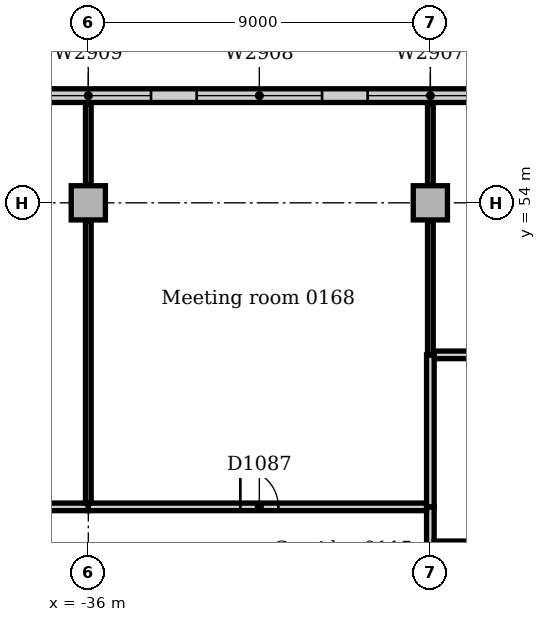
"""IFC4 building model, lengths in metres.
Left out: names, types, materials, properties, quantities, classifications, styles, units other than length and angle.
Written with IfcOpenShell. Run it as: python <this file> out.ifc"""

import sys

from ifc_helpers import new_model, si_unit, direction, frame, frame_2d, origin, origin_2d, place, context, subcontext, project, spatial, rectangle, extrude, element, fill, save


model = new_model("IFC4")
c1 = context("Model", 3, precision=1e-05, world=origin(), true_north=direction((0.0, 1.0)))
c2 = subcontext(c1, "Body", "Model", "MODEL_VIEW")
j1 = project(units=[si_unit("LENGTHUNIT", "METRE"), si_unit("PLANEANGLEUNIT", "RADIAN")], contexts=[c1])
p1 = place(None, origin())
s1 = spatial("IfcSite", under=j1, at=p1, CompositionType="ELEMENT")
p2 = place(p1, origin())
s2 = spatial("IfcBuilding", under=s1, at=p2, CompositionType="ELEMENT")
p3 = place(p2, frame((0.0, 0.0, 6.0)))
s3 = spatial("IfcBuildingStorey", under=s2, at=p3, CompositionType="ELEMENT", Elevation=6.0)
for number, where, z_axis, x_axis in (
    (1, (-36.0, 54.0, 0.0), (0.0, 0.0, 1.0), (1.0, 0.0, 0.0)),
    (2, (-27.0, 54.0, 0.0), (0.0, 0.0, 1.0), (1.0, 0.0, 0.0)),
):
    element("IfcColumn", number, at=place(p3, frame(where, z_axis=z_axis, x_axis=x_axis)), inside=s3, PredefinedType="COLUMN", context=c2, shape_type="SweptSolid", body=[
        extrude(rectangle(XDim=0.9, YDim=0.9, at=origin_2d()), origin(), (0.0, 0.0, 1.0), 4.7),
    ])
p4 = place(p3, frame((63.0, 56.82, 0.0), z_axis=(0.0, 0.0, 1.0), x_axis=(-1.0, 0.0, 0.0)))
e3 = element("IfcWall", 3, at=p4, inside=s3, PredefinedType="STANDARD", context=c2, shape_type="SweptSolid", body=[
    extrude(rectangle(XDim=144.0, YDim=0.36, at=frame_2d((72.0, 0.0))), origin(), (0.0, 0.0, 1.0), 4.7),
])
p5 = place(p4, frame((2.85, 0.0, 0.9)))
e4 = element("IfcOpeningElement", 4, at=p5, cuts=e3, PredefinedType="OPENING", context=c2, shape_type="SweptSolid", body=[
    extrude(rectangle(XDim=3.3, YDim=2.4, at=frame_2d((1.65, 1.2))), frame((0.0, 0.19, 0.0), z_axis=(0.0, -1.0, 0.0), x_axis=(1.0, 0.0, 0.0)), (0.0, 0.0, 1.0), 0.38),
])
p6 = place(p4, frame((7.35, 0.0, 0.9)))
e5 = element("IfcOpeningElement", 5, at=p6, cuts=e3, PredefinedType="OPENING", context=c2, shape_type="SweptSolid", body=[
    extrude(rectangle(XDim=3.3, YDim=2.4, at=frame_2d((1.65, 1.2))), frame((0.0, 0.19, 0.0), z_axis=(0.0, -1.0, 0.0), x_axis=(1.0, 0.0, 0.0)), (0.0, 0.0, 1.0), 0.38),
])
p7 = place(p4, frame((11.85, 0.0, 0.9)))
e6 = element("IfcOpeningElement", 6, at=p7, cuts=e3, PredefinedType="OPENING", context=c2, shape_type="SweptSolid", body=[
    extrude(rectangle(XDim=3.3, YDim=2.4, at=frame_2d((1.65, 1.2))), frame((0.0, 0.19, 0.0), z_axis=(0.0, -1.0, 0.0), x_axis=(1.0, 0.0, 0.0)), (0.0, 0.0, 1.0), 0.38),
])
p8 = place(p4, frame((16.35, 0.0, 0.9)))
e7 = element("IfcOpeningElement", 7, at=p8, cuts=e3, PredefinedType="OPENING", context=c2, shape_type="SweptSolid", body=[
    extrude(rectangle(XDim=3.3, YDim=2.4, at=frame_2d((1.65, 1.2))), frame((0.0, 0.19, 0.0), z_axis=(0.0, -1.0, 0.0), x_axis=(1.0, 0.0, 0.0)), (0.0, 0.0, 1.0), 0.38),
])
p9 = place(p4, frame((20.85, 0.0, 0.9)))
e8 = element("IfcOpeningElement", 8, at=p9, cuts=e3, PredefinedType="OPENING", context=c2, shape_type="SweptSolid", body=[
    extrude(rectangle(XDim=3.3, YDim=2.4, at=frame_2d((1.65, 1.2))), frame((0.0, 0.19, 0.0), z_axis=(0.0, -1.0, 0.0), x_axis=(1.0, 0.0, 0.0)), (0.0, 0.0, 1.0), 0.38),
])
p10 = place(p4, frame((25.35, 0.0, 0.9)))
e9 = element("IfcOpeningElement", 9, at=p10, cuts=e3, PredefinedType="OPENING", context=c2, shape_type="SweptSolid", body=[
    extrude(rectangle(XDim=3.3, YDim=2.4, at=frame_2d((1.65, 1.2))), frame((0.0, 0.19, 0.0), z_axis=(0.0, -1.0, 0.0), x_axis=(1.0, 0.0, 0.0)), (0.0, 0.0, 1.0), 0.38),
])
p11 = place(p4, frame((29.85, 0.0, 0.9)))
e10 = element("IfcOpeningElement", 10, at=p11, cuts=e3, PredefinedType="OPENING", context=c2, shape_type="SweptSolid", body=[
    extrude(rectangle(XDim=3.3, YDim=2.4, at=frame_2d((1.65, 1.2))), frame((0.0, 0.19, 0.0), z_axis=(0.0, -1.0, 0.0), x_axis=(1.0, 0.0, 0.0)), (0.0, 0.0, 1.0), 0.38),
])
p12 = place(p4, frame((34.35, 0.0, 0.9)))
e11 = element("IfcOpeningElement", 11, at=p12, cuts=e3, PredefinedType="OPENING", context=c2, shape_type="SweptSolid", body=[
    extrude(rectangle(XDim=3.3, YDim=2.4, at=frame_2d((1.65, 1.2))), frame((0.0, 0.19, 0.0), z_axis=(0.0, -1.0, 0.0), x_axis=(1.0, 0.0, 0.0)), (0.0, 0.0, 1.0), 0.38),
])
p13 = place(p4, frame((38.85, 0.0, 0.9)))
e12 = element("IfcOpeningElement", 12, at=p13, cuts=e3, PredefinedType="OPENING", context=c2, shape_type="SweptSolid", body=[
    extrude(rectangle(XDim=3.3, YDim=2.4, at=frame_2d((1.65, 1.2))), frame((0.0, 0.19, 0.0), z_axis=(0.0, -1.0, 0.0), x_axis=(1.0, 0.0, 0.0)), (0.0, 0.0, 1.0), 0.38),
])
p14 = place(p4, frame((43.35, 0.0, 0.9)))
e13 = element("IfcOpeningElement", 13, at=p14, cuts=e3, PredefinedType="OPENING", context=c2, shape_type="SweptSolid", body=[
    extrude(rectangle(XDim=3.3, YDim=2.4, at=frame_2d((1.65, 1.2))), frame((0.0, 0.19, 0.0), z_axis=(0.0, -1.0, 0.0), x_axis=(1.0, 0.0, 0.0)), (0.0, 0.0, 1.0), 0.38),
])
p15 = place(p4, frame((47.85, 0.0, 0.9)))
e14 = element("IfcOpeningElement", 14, at=p15, cuts=e3, PredefinedType="OPENING", context=c2, shape_type="SweptSolid", body=[
    extrude(rectangle(XDim=3.3, YDim=2.4, at=frame_2d((1.65, 1.2))), frame((0.0, 0.19, 0.0), z_axis=(0.0, -1.0, 0.0), x_axis=(1.0, 0.0, 0.0)), (0.0, 0.0, 1.0), 0.38),
])
p16 = place(p4, frame((52.35, 0.0, 0.9)))
e15 = element("IfcOpeningElement", 15, at=p16, cuts=e3, PredefinedType="OPENING", context=c2, shape_type="SweptSolid", body=[
    extrude(rectangle(XDim=3.3, YDim=2.4, at=frame_2d((1.65, 1.2))), frame((0.0, 0.19, 0.0), z_axis=(0.0, -1.0, 0.0), x_axis=(1.0, 0.0, 0.0)), (0.0, 0.0, 1.0), 0.38),
])
p17 = place(p4, frame((56.85, 0.0, 0.9)))
e16 = element("IfcOpeningElement", 16, at=p17, cuts=e3, PredefinedType="OPENING", context=c2, shape_type="SweptSolid", body=[
    extrude(rectangle(XDim=3.3, YDim=2.4, at=frame_2d((1.65, 1.2))), frame((0.0, 0.19, 0.0), z_axis=(0.0, -1.0, 0.0), x_axis=(1.0, 0.0, 0.0)), (0.0, 0.0, 1.0), 0.38),
])
p18 = place(p4, frame((61.35, 0.0, 0.9)))
e17 = element("IfcOpeningElement", 17, at=p18, cuts=e3, PredefinedType="OPENING", context=c2, shape_type="SweptSolid", body=[
    extrude(rectangle(XDim=3.3, YDim=2.4, at=frame_2d((1.65, 1.2))), frame((0.0, 0.19, 0.0), z_axis=(0.0, -1.0, 0.0), x_axis=(1.0, 0.0, 0.0)), (0.0, 0.0, 1.0), 0.38),
])
p19 = place(p4, frame((65.85, 0.0, 0.9)))
e18 = element("IfcOpeningElement", 18, at=p19, cuts=e3, PredefinedType="OPENING", context=c2, shape_type="SweptSolid", body=[
    extrude(rectangle(XDim=3.3, YDim=2.4, at=frame_2d((1.65, 1.2))), frame((0.0, 0.19, 0.0), z_axis=(0.0, -1.0, 0.0), x_axis=(1.0, 0.0, 0.0)), (0.0, 0.0, 1.0), 0.38),
])
p20 = place(p4, frame((70.35, 0.0, 0.9)))
e19 = element("IfcOpeningElement", 19, at=p20, cuts=e3, PredefinedType="OPENING", context=c2, shape_type="SweptSolid", body=[
    extrude(rectangle(XDim=3.3, YDim=2.4, at=frame_2d((1.65, 1.2))), frame((0.0, 0.19, 0.0), z_axis=(0.0, -1.0, 0.0), x_axis=(1.0, 0.0, 0.0)), (0.0, 0.0, 1.0), 0.38),
])
p21 = place(p4, frame((74.85, 0.0, 0.9)))
e20 = element("IfcOpeningElement", 20, at=p21, cuts=e3, PredefinedType="OPENING", context=c2, shape_type="SweptSolid", body=[
    extrude(rectangle(XDim=3.3, YDim=2.4, at=frame_2d((1.65, 1.2))), frame((0.0, 0.19, 0.0), z_axis=(0.0, -1.0, 0.0), x_axis=(1.0, 0.0, 0.0)), (0.0, 0.0, 1.0), 0.38),
])
p22 = place(p4, frame((79.35, 0.0, 0.9)))
e21 = element("IfcOpeningElement", 21, at=p22, cuts=e3, PredefinedType="OPENING", context=c2, shape_type="SweptSolid", body=[
    extrude(rectangle(XDim=3.3, YDim=2.4, at=frame_2d((1.65, 1.2))), frame((0.0, 0.19, 0.0), z_axis=(0.0, -1.0, 0.0), x_axis=(1.0, 0.0, 0.0)), (0.0, 0.0, 1.0), 0.38),
])
p23 = place(p4, frame((83.85, 0.0, 0.9)))
e22 = element("IfcOpeningElement", 22, at=p23, cuts=e3, PredefinedType="OPENING", context=c2, shape_type="SweptSolid", body=[
    extrude(rectangle(XDim=3.3, YDim=2.4, at=frame_2d((1.65, 1.2))), frame((0.0, 0.19, 0.0), z_axis=(0.0, -1.0, 0.0), x_axis=(1.0, 0.0, 0.0)), (0.0, 0.0, 1.0), 0.38),
])
p24 = place(p4, frame((88.35, 0.0, 0.9)))
e23 = element("IfcOpeningElement", 23, at=p24, cuts=e3, PredefinedType="OPENING", context=c2, shape_type="SweptSolid", body=[
    extrude(rectangle(XDim=3.3, YDim=2.4, at=frame_2d((1.65, 1.2))), frame((0.0, 0.19, 0.0), z_axis=(0.0, -1.0, 0.0), x_axis=(1.0, 0.0, 0.0)), (0.0, 0.0, 1.0), 0.38),
])
p25 = place(p4, frame((92.85, 0.0, 0.9)))
e24 = element("IfcOpeningElement", 24, at=p25, cuts=e3, PredefinedType="OPENING", context=c2, shape_type="SweptSolid", body=[
    extrude(rectangle(XDim=3.3, YDim=2.4, at=frame_2d((1.65, 1.2))), frame((0.0, 0.19, 0.0), z_axis=(0.0, -1.0, 0.0), x_axis=(1.0, 0.0, 0.0)), (0.0, 0.0, 1.0), 0.38),
])
p26 = place(p4, frame((97.35, 0.0, 0.9)))
e25 = element("IfcOpeningElement", 25, at=p26, cuts=e3, PredefinedType="OPENING", context=c2, shape_type="SweptSolid", body=[
    extrude(rectangle(XDim=3.3, YDim=2.4, at=frame_2d((1.65, 1.2))), frame((0.0, 0.19, 0.0), z_axis=(0.0, -1.0, 0.0), x_axis=(1.0, 0.0, 0.0)), (0.0, 0.0, 1.0), 0.38),
])
p27 = place(p4, frame((101.85, 0.0, 0.9)))
e26 = element("IfcOpeningElement", 26, at=p27, cuts=e3, PredefinedType="OPENING", context=c2, shape_type="SweptSolid", body=[
    extrude(rectangle(XDim=3.3, YDim=2.4, at=frame_2d((1.65, 1.2))), frame((0.0, 0.19, 0.0), z_axis=(0.0, -1.0, 0.0), x_axis=(1.0, 0.0, 0.0)), (0.0, 0.0, 1.0), 0.38),
])
p28 = place(p4, frame((106.35, 0.0, 0.9)))
e27 = element("IfcOpeningElement", 27, at=p28, cuts=e3, PredefinedType="OPENING", context=c2, shape_type="SweptSolid", body=[
    extrude(rectangle(XDim=3.3, YDim=2.4, at=frame_2d((1.65, 1.2))), frame((0.0, 0.19, 0.0), z_axis=(0.0, -1.0, 0.0), x_axis=(1.0, 0.0, 0.0)), (0.0, 0.0, 1.0), 0.38),
])
p29 = place(p4, frame((110.85, 0.0, 0.9)))
e28 = element("IfcOpeningElement", 28, at=p29, cuts=e3, PredefinedType="OPENING", context=c2, shape_type="SweptSolid", body=[
    extrude(rectangle(XDim=3.3, YDim=2.4, at=frame_2d((1.65, 1.2))), frame((0.0, 0.19, 0.0), z_axis=(0.0, -1.0, 0.0), x_axis=(1.0, 0.0, 0.0)), (0.0, 0.0, 1.0), 0.38),
])
p30 = place(p4, frame((115.35, 0.0, 0.9)))
e29 = element("IfcOpeningElement", 29, at=p30, cuts=e3, PredefinedType="OPENING", context=c2, shape_type="SweptSolid", body=[
    extrude(rectangle(XDim=3.3, YDim=2.4, at=frame_2d((1.65, 1.2))), frame((0.0, 0.19, 0.0), z_axis=(0.0, -1.0, 0.0), x_axis=(1.0, 0.0, 0.0)), (0.0, 0.0, 1.0), 0.38),
])
p31 = place(p4, frame((119.85, 0.0, 0.9)))
e30 = element("IfcOpeningElement", 30, at=p31, cuts=e3, PredefinedType="OPENING", context=c2, shape_type="SweptSolid", body=[
    extrude(rectangle(XDim=3.3, YDim=2.4, at=frame_2d((1.65, 1.2))), frame((0.0, 0.19, 0.0), z_axis=(0.0, -1.0, 0.0), x_axis=(1.0, 0.0, 0.0)), (0.0, 0.0, 1.0), 0.38),
])
p32 = place(p4, frame((124.35, 0.0, 0.9)))
e31 = element("IfcOpeningElement", 31, at=p32, cuts=e3, PredefinedType="OPENING", context=c2, shape_type="SweptSolid", body=[
    extrude(rectangle(XDim=3.3, YDim=2.4, at=frame_2d((1.65, 1.2))), frame((0.0, 0.19, 0.0), z_axis=(0.0, -1.0, 0.0), x_axis=(1.0, 0.0, 0.0)), (0.0, 0.0, 1.0), 0.38),
])
p33 = place(p4, frame((128.85, 0.0, 0.9)))
e32 = element("IfcOpeningElement", 32, at=p33, cuts=e3, PredefinedType="OPENING", context=c2, shape_type="SweptSolid", body=[
    extrude(rectangle(XDim=3.3, YDim=2.4, at=frame_2d((1.65, 1.2))), frame((0.0, 0.19, 0.0), z_axis=(0.0, -1.0, 0.0), x_axis=(1.0, 0.0, 0.0)), (0.0, 0.0, 1.0), 0.38),
])
p34 = place(p4, frame((133.35, 0.0, 0.9)))
e33 = element("IfcOpeningElement", 33, at=p34, cuts=e3, PredefinedType="OPENING", context=c2, shape_type="SweptSolid", body=[
    extrude(rectangle(XDim=3.3, YDim=2.4, at=frame_2d((1.65, 1.2))), frame((0.0, 0.19, 0.0), z_axis=(0.0, -1.0, 0.0), x_axis=(1.0, 0.0, 0.0)), (0.0, 0.0, 1.0), 0.38),
])
p35 = place(p4, frame((137.85, 0.0, 0.9)))
e34 = element("IfcOpeningElement", 34, at=p35, cuts=e3, PredefinedType="OPENING", context=c2, shape_type="SweptSolid", body=[
    extrude(rectangle(XDim=3.3, YDim=2.4, at=frame_2d((1.65, 1.2))), frame((0.0, 0.19, 0.0), z_axis=(0.0, -1.0, 0.0), x_axis=(1.0, 0.0, 0.0)), (0.0, 0.0, 1.0), 0.38),
])
p36 = place(p3, frame((-27.0, 45.0, 0.0), z_axis=(0.0, 0.0, 1.0), x_axis=(0.0, 1.0, 0.0)))
e35 = element("IfcWall", 35, at=p36, inside=s3, PredefinedType="PARTITIONING", context=c2, shape_type="SweptSolid", body=[
    extrude(rectangle(XDim=1.0, YDim=0.2, at=frame_2d((0.5, 0.0))), origin(), (0.0, 0.0, 1.0), 4.7),
])
p37 = place(p3, frame((-42.0, 46.0, 0.0), z_axis=(0.0, 0.0, 1.0), x_axis=(1.0, 0.0, 0.0)))
e36 = element("IfcWall", 36, at=p37, inside=s3, PredefinedType="PARTITIONING", context=c2, shape_type="SweptSolid", body=[
    extrude(rectangle(XDim=6.0, YDim=0.2, at=frame_2d((3.0, 0.0))), origin(), (0.0, 0.0, 1.0), 4.7),
])
p38 = place(p37, frame((2.5, 0.0, 0.0)))
e37 = element("IfcOpeningElement", 37, at=p38, cuts=e36, PredefinedType="OPENING", context=c2, shape_type="SweptSolid", body=[
    extrude(rectangle(XDim=1.0, YDim=2.1, at=frame_2d((0.5, 1.05))), frame((0.0, 0.11, 0.0), z_axis=(0.0, -1.0, 0.0), x_axis=(1.0, 0.0, 0.0)), (0.0, 0.0, 1.0), 0.22),
])
p39 = place(p3, frame((-36.0, 46.0, 0.0), z_axis=(0.0, 0.0, 1.0), x_axis=(1.0, 0.0, 0.0)))
e38 = element("IfcWall", 38, at=p39, inside=s3, PredefinedType="PARTITIONING", context=c2, shape_type="SweptSolid", body=[
    extrude(rectangle(XDim=8.9, YDim=0.2, at=frame_2d((4.45, 0.0))), origin(), (0.0, 0.0, 1.0), 4.7),
])
p40 = place(p39, frame((4.0, 0.0, 0.0)))
e39 = element("IfcOpeningElement", 39, at=p40, cuts=e38, PredefinedType="OPENING", context=c2, shape_type="SweptSolid", body=[
    extrude(rectangle(XDim=1.0, YDim=2.1, at=frame_2d((0.5, 1.05))), frame((0.0, 0.11, 0.0), z_axis=(0.0, -1.0, 0.0), x_axis=(1.0, 0.0, 0.0)), (0.0, 0.0, 1.0), 0.22),
])
p41 = place(p3, frame((-26.9, 45.0, 0.0), z_axis=(0.0, 0.0, 1.0), x_axis=(1.0, 0.0, 0.0)))
e40 = element("IfcWall", 40, at=p41, inside=s3, PredefinedType="PARTITIONING", context=c2, shape_type="SweptSolid", body=[
    extrude(rectangle(XDim=8.43, YDim=0.2, at=frame_2d((4.215, 0.0))), origin(), (0.0, 0.0, 1.0), 4.7),
])
p42 = place(p3, frame((-26.9, 50.0, 0.0), z_axis=(0.0, 0.0, 1.0), x_axis=(1.0, 0.0, 0.0)))
e41 = element("IfcWall", 41, at=p42, inside=s3, PredefinedType="PARTITIONING", context=c2, shape_type="SweptSolid", body=[
    extrude(rectangle(XDim=8.9, YDim=0.2, at=frame_2d((4.45, 0.0))), origin(), (0.0, 0.0, 1.0), 4.7),
])
p43 = place(p42, frame((3.9, 0.0, 0.0)))
e42 = element("IfcOpeningElement", 42, at=p43, cuts=e41, PredefinedType="OPENING", context=c2, shape_type="SweptSolid", body=[
    extrude(rectangle(XDim=1.0, YDim=2.1, at=frame_2d((0.5, 1.05))), frame((0.0, 0.11, 0.0), z_axis=(0.0, -1.0, 0.0), x_axis=(1.0, 0.0, 0.0)), (0.0, 0.0, 1.0), 0.22),
])
p44 = place(p3, frame((-27.0, 46.0, 0.0), z_axis=(0.0, 0.0, 1.0), x_axis=(0.0, 1.0, 0.0)))
e43 = element("IfcWall", 43, at=p44, inside=s3, PredefinedType="PARTITIONING", context=c2, shape_type="SweptSolid", body=[
    extrude(rectangle(XDim=4.0, YDim=0.2, at=frame_2d((2.0, 0.0))), origin(), (0.0, 0.0, 1.0), 4.7),
])
p45 = place(p3, frame((-27.0, 50.0, 0.0), z_axis=(0.0, 0.0, 1.0), x_axis=(0.0, 1.0, 0.0)))
e44 = element("IfcWall", 44, at=p45, inside=s3, PredefinedType="PARTITIONING", context=c2, shape_type="SweptSolid", body=[
    extrude(rectangle(XDim=3.53, YDim=0.15, at=frame_2d((1.765, 0.0))), origin(), (0.0, 0.0, 1.0), 4.7),
])
p46 = place(p3, frame((-27.0, 54.47, 0.0), z_axis=(0.0, 0.0, 1.0), x_axis=(0.0, 1.0, 0.0)))
e45 = element("IfcWall", 45, at=p46, inside=s3, PredefinedType="PARTITIONING", context=c2, shape_type="SweptSolid", body=[
    extrude(rectangle(XDim=2.13, YDim=0.15, at=frame_2d((1.065, 0.0))), origin(), (0.0, 0.0, 1.0), 4.7),
])
p47 = place(p3, frame((-36.0, 46.1, 0.0), z_axis=(0.0, 0.0, 1.0), x_axis=(0.0, 1.0, 0.0)))
e46 = element("IfcWall", 46, at=p47, inside=s3, PredefinedType="PARTITIONING", context=c2, shape_type="SweptSolid", body=[
    extrude(rectangle(XDim=7.43, YDim=0.15, at=frame_2d((3.715, 0.0))), origin(), (0.0, 0.0, 1.0), 4.7),
])
p48 = place(p3, frame((-36.0, 54.47, 0.0), z_axis=(0.0, 0.0, 1.0), x_axis=(0.0, 1.0, 0.0)))
e47 = element("IfcWall", 47, at=p48, inside=s3, PredefinedType="PARTITIONING", context=c2, shape_type="SweptSolid", body=[
    extrude(rectangle(XDim=2.13, YDim=0.15, at=frame_2d((1.065, 0.0))), origin(), (0.0, 0.0, 1.0), 4.7),
])
p49 = place(p24, origin())
e48 = element("IfcWindow", 48, at=p49, inside=s3, PartitioningType="SINGLE_PANEL", PredefinedType="WINDOW", context=c2, shape_type="SweptSolid", body=[
    extrude(rectangle(XDim=3.3, YDim=2.4, at=frame_2d((1.65, 1.2))), frame((0.0, 0.13, 0.0), z_axis=(0.0, -1.0, 0.0), x_axis=(1.0, 0.0, 0.0)), (0.0, 0.0, 1.0), 0.06),
])
fill(e23, e48)
p50 = place(p25, origin())
e49 = element("IfcWindow", 49, at=p50, inside=s3, PartitioningType="SINGLE_PANEL", PredefinedType="WINDOW", context=c2, shape_type="SweptSolid", body=[
    extrude(rectangle(XDim=3.3, YDim=2.4, at=frame_2d((1.65, 1.2))), frame((0.0, 0.13, 0.0), z_axis=(0.0, -1.0, 0.0), x_axis=(1.0, 0.0, 0.0)), (0.0, 0.0, 1.0), 0.06),
])
fill(e24, e49)
p51 = place(p26, origin())
e50 = element("IfcWindow", 50, at=p51, inside=s3, PartitioningType="SINGLE_PANEL", PredefinedType="WINDOW", context=c2, shape_type="SweptSolid", body=[
    extrude(rectangle(XDim=3.3, YDim=2.4, at=frame_2d((1.65, 1.2))), frame((0.0, 0.13, 0.0), z_axis=(0.0, -1.0, 0.0), x_axis=(1.0, 0.0, 0.0)), (0.0, 0.0, 1.0), 0.06),
])
fill(e25, e50)
p52 = place(p40, origin())
e51 = element("IfcDoor", 51, at=p52, inside=s3, OperationType="SINGLE_SWING_LEFT", PredefinedType="DOOR", context=c2, shape_type="SweptSolid", body=[
    extrude(rectangle(XDim=1.0, YDim=2.1, at=frame_2d((0.5, 1.05))), frame((0.0, 0.025, 0.0), z_axis=(0.0, -1.0, 0.0), x_axis=(1.0, 0.0, 0.0)), (0.0, 0.0, 1.0), 0.05),
])
fill(e39, e51)
save(model, sys.argv[1])
